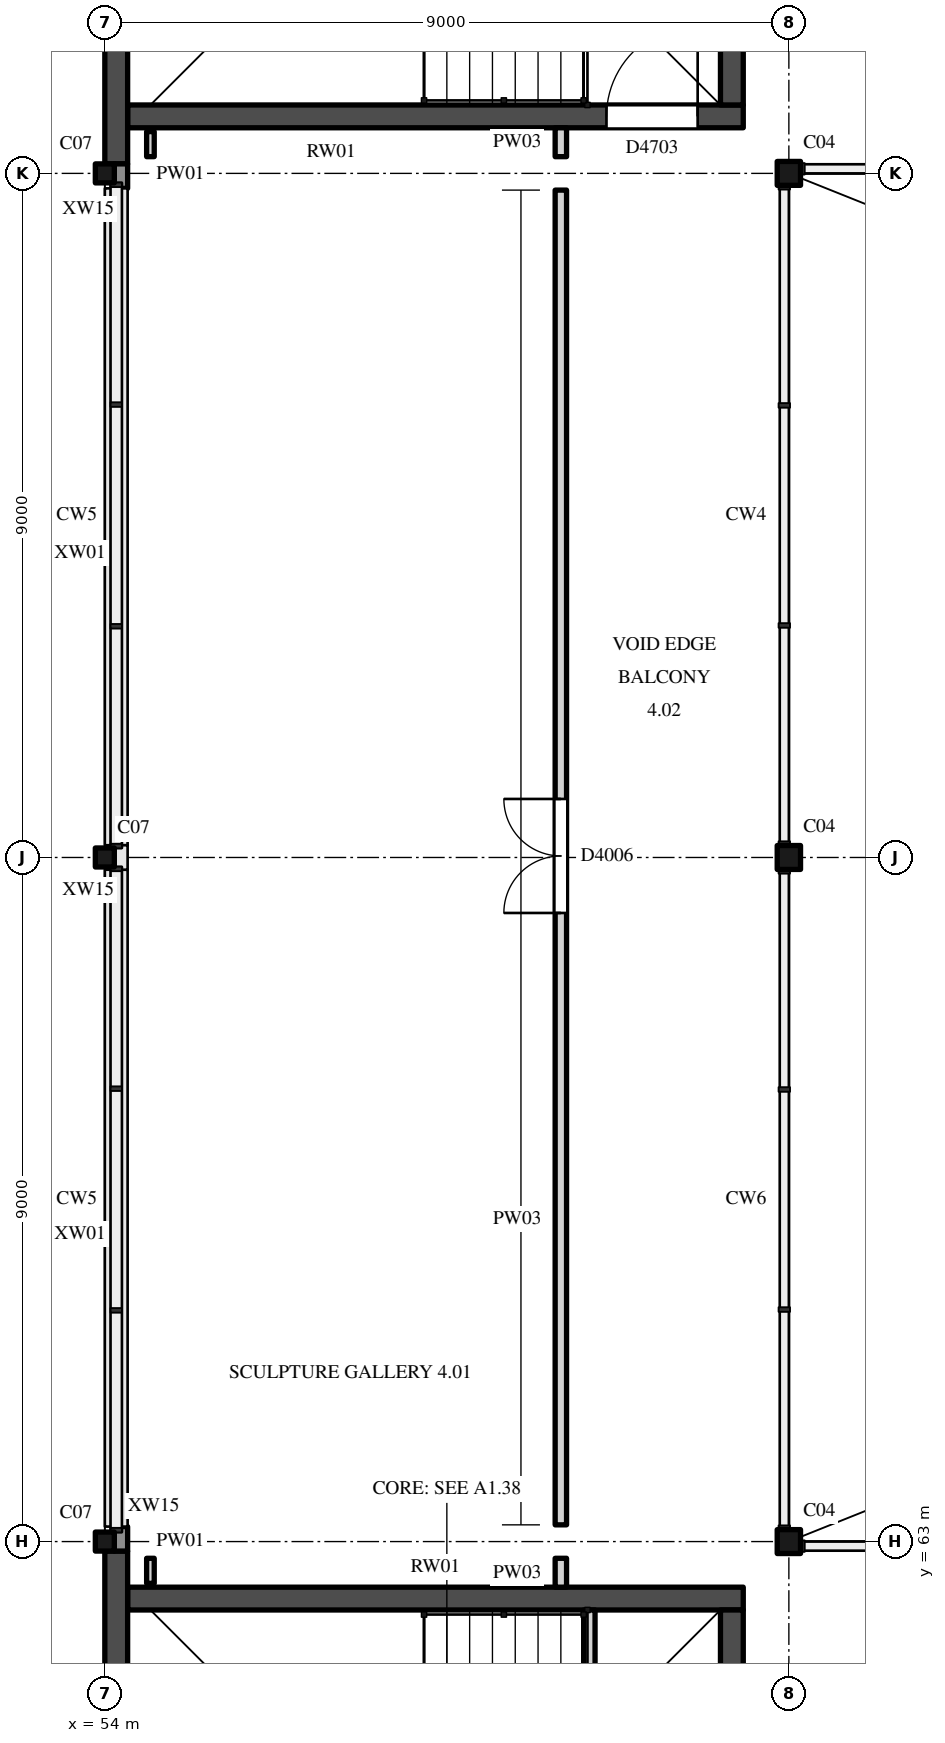
"""IFC4 building model, lengths in metres.
Left out: names, types, materials, properties, quantities, classifications, styles, units other than length and angle.
Written with IfcOpenShell. Run it as: python <this file> out.ifc"""

import sys

from ifc_helpers import new_model, si_unit, direction, frame, frame_2d, origin, origin_2d, place, context, subcontext, project, spatial, rectangle, hollow_rectangle, i_section, extrude, element, fill, save


model = new_model("IFC4")
c1 = context("Model", 3, precision=1e-05, world=origin(), true_north=direction((0.0, 1.0)))
c2 = subcontext(c1, "Body", "Model", "MODEL_VIEW")
j1 = project(units=[si_unit("LENGTHUNIT", "METRE"), si_unit("PLANEANGLEUNIT", "RADIAN")], contexts=[c1])
p1 = place(None, origin())
s1 = spatial("IfcSite", under=j1, at=p1, CompositionType="ELEMENT")
p2 = place(p1, origin())
s2 = spatial("IfcBuilding", under=s1, at=p2, CompositionType="ELEMENT")
p3 = place(p2, frame((0.0, 0.0, 26.0)))
s3 = spatial("IfcBuildingStorey", under=s2, at=p3, CompositionType="ELEMENT", Elevation=26.0)
p4 = place(p3, frame((54.0, 63.0, 0.0), z_axis=(0.0, 0.0, 1.0), x_axis=(1.0, 0.0, 0.0)))
e1 = element("IfcColumn", 1, at=p4, inside=s3, PredefinedType="COLUMN", context=c2, shape_type="SweptSolid", body=[
    extrude(hollow_rectangle(XDim=0.25, YDim=0.25, WallThickness=0.009, InnerFilletRadius=0.013, OuterFilletRadius=0.022, at=origin_2d()), origin(), (0.0, 0.0, 1.0), 5.0),
])
p5 = place(p3, frame((63.0, 63.0, 0.0), z_axis=(0.0, 0.0, 1.0), x_axis=(1.0, 0.0, 0.0)))
e2 = element("IfcColumn", 2, at=p5, inside=s3, PredefinedType="COLUMN", context=c2, shape_type="SweptSolid", body=[
    extrude(i_section(OverallWidth=0.307, OverallDepth=0.315, WebThickness=0.012, FlangeThickness=0.019, FilletRadius=0.017, at=origin_2d()), origin(), (0.0, 0.0, 1.0), 5.0),
])
p6 = place(p3, frame((54.0, 72.0, 0.0), z_axis=(0.0, 0.0, 1.0), x_axis=(1.0, 0.0, 0.0)))
e3 = element("IfcColumn", 3, at=p6, inside=s3, PredefinedType="COLUMN", context=c2, shape_type="SweptSolid", body=[
    extrude(hollow_rectangle(XDim=0.25, YDim=0.25, WallThickness=0.009, InnerFilletRadius=0.013, OuterFilletRadius=0.022, at=origin_2d()), origin(), (0.0, 0.0, 1.0), 5.0),
])
p7 = place(p3, frame((63.0, 72.0, 0.0), z_axis=(0.0, 0.0, 1.0), x_axis=(1.0, 0.0, 0.0)))
e4 = element("IfcColumn", 4, at=p7, inside=s3, PredefinedType="COLUMN", context=c2, shape_type="SweptSolid", body=[
    extrude(i_section(OverallWidth=0.307, OverallDepth=0.315, WebThickness=0.012, FlangeThickness=0.019, FilletRadius=0.017, at=origin_2d()), origin(), (0.0, 0.0, 1.0), 5.0),
])
p8 = place(p3, frame((54.0, 81.0, 0.0), z_axis=(0.0, 0.0, 1.0), x_axis=(1.0, 0.0, 0.0)))
e5 = element("IfcColumn", 5, at=p8, inside=s3, PredefinedType="COLUMN", context=c2, shape_type="SweptSolid", body=[
    extrude(hollow_rectangle(XDim=0.25, YDim=0.25, WallThickness=0.009, InnerFilletRadius=0.013, OuterFilletRadius=0.022, at=origin_2d()), origin(), (0.0, 0.0, 1.0), 5.0),
])
p9 = place(p3, frame((63.0, 81.0, 0.0), z_axis=(0.0, 0.0, 1.0), x_axis=(1.0, 0.0, 0.0)))
e6 = element("IfcColumn", 6, at=p9, inside=s3, PredefinedType="COLUMN", context=c2, shape_type="SweptSolid", body=[
    extrude(i_section(OverallWidth=0.307, OverallDepth=0.315, WebThickness=0.012, FlangeThickness=0.019, FilletRadius=0.017, at=origin_2d()), origin(), (0.0, 0.0, 1.0), 5.0),
])
p10 = place(p3, frame((54.3, 62.25, 0.0), z_axis=(0.0, 0.0, 1.0), x_axis=(1.0, 0.0, 0.0)))
e7 = element("IfcWall", 7, at=p10, inside=s3, PredefinedType="SHEAR", context=c2, shape_type="SweptSolid", body=[
    extrude(rectangle(XDim=8.1, YDim=0.3, at=frame_2d((4.05, 0.0))), origin(), (0.0, 0.0, 1.0), 5.0),
])
p11 = place(p3, frame((54.15, 54.125, 0.0), z_axis=(0.0, 0.0, 1.0), x_axis=(0.0, 1.0, 0.0)))
e8 = element("IfcWall", 8, at=p11, inside=s3, PredefinedType="SHEAR", context=c2, shape_type="SweptSolid", body=[
    extrude(rectangle(XDim=8.75, YDim=0.3, at=frame_2d((4.375, 0.0))), origin(), (0.0, 0.0, 1.0), 5.0),
])
p12 = place(p3, frame((62.25, 54.3, 0.0), z_axis=(0.0, 0.0, 1.0), x_axis=(0.0, 1.0, 0.0)))
e9 = element("IfcWall", 9, at=p12, inside=s3, PredefinedType="SHEAR", context=c2, shape_type="SweptSolid", body=[
    extrude(rectangle(XDim=7.8, YDim=0.3, at=frame_2d((3.9, 0.0))), origin(), (0.0, 0.0, 1.0), 5.0),
])
p13 = place(p12, frame((3.6, 0.0, 0.0)))
e10 = element("IfcOpeningElement", 10, at=p13, cuts=e9, PredefinedType="OPENING", context=c2, shape_type="SweptSolid", body=[
    extrude(rectangle(XDim=1.2, YDim=2.1, at=frame_2d((0.6, 1.05))), frame((0.0, 0.16, 0.0), z_axis=(0.0, -1.0, 0.0), x_axis=(1.0, 0.0, 0.0)), (0.0, 0.0, 1.0), 0.32),
])
p14 = place(p3, frame((54.3, 81.75, 0.0), z_axis=(0.0, 0.0, 1.0), x_axis=(1.0, 0.0, 0.0)))
e11 = element("IfcWall", 11, at=p14, inside=s3, PredefinedType="SHEAR", context=c2, shape_type="SweptSolid", body=[
    extrude(rectangle(XDim=8.1, YDim=0.3, at=frame_2d((4.05, 0.0))), origin(), (0.0, 0.0, 1.0), 5.0),
])
p15 = place(p14, frame((6.3, 0.0, 0.0)))
e12 = element("IfcOpeningElement", 12, at=p15, cuts=e11, PredefinedType="OPENING", context=c2, shape_type="SweptSolid", body=[
    extrude(rectangle(XDim=1.2, YDim=2.1, at=frame_2d((0.6, 1.05))), frame((0.0, 0.16, 0.0), z_axis=(0.0, -1.0, 0.0), x_axis=(1.0, 0.0, 0.0)), (0.0, 0.0, 1.0), 0.32),
])
p16 = place(p3, frame((54.15, 81.125, 0.0), z_axis=(0.0, 0.0, 1.0), x_axis=(0.0, 1.0, 0.0)))
e13 = element("IfcWall", 13, at=p16, inside=s3, PredefinedType="SHEAR", context=c2, shape_type="SweptSolid", body=[
    extrude(rectangle(XDim=8.711, YDim=0.3, at=frame_2d((4.356, 0.0))), origin(), (0.0, 0.0, 1.0), 5.0),
])
p17 = place(p3, frame((62.25, 81.9, 0.0), z_axis=(0.0, 0.0, 1.0), x_axis=(0.0, 1.0, 0.0)))
e14 = element("IfcWall", 14, at=p17, inside=s3, PredefinedType="SHEAR", context=c2, shape_type="SweptSolid", body=[
    extrude(rectangle(XDim=7.8, YDim=0.3, at=frame_2d((3.9, 0.0))), origin(), (0.0, 0.0, 1.0), 5.0),
])
p18 = place(p17, frame((3.0, 0.0, 0.0)))
e15 = element("IfcOpeningElement", 15, at=p18, cuts=e14, PredefinedType="OPENING", context=c2, shape_type="SweptSolid", body=[
    extrude(rectangle(XDim=1.2, YDim=2.1, at=frame_2d((0.6, 1.05))), frame((0.0, 0.16, 0.0), z_axis=(0.0, -1.0, 0.0), x_axis=(1.0, 0.0, 0.0)), (0.0, 0.0, 1.0), 0.32),
])
p19 = place(p3, frame((60.375, 58.5, 0.0), z_axis=(0.0, 0.0, 1.0), x_axis=(0.0, 1.0, 0.0)))
e16 = element("IfcWall", 16, at=p19, inside=s3, PredefinedType="STANDARD", context=c2, shape_type="SweptSolid", body=[
    extrude(rectangle(XDim=3.6, YDim=0.15, at=frame_2d((1.8, 0.0))), origin(), (0.0, 0.0, 1.0), 2.3),
])
for number, where, z_axis, x_axis in (
    (17, (54.15, 63.197, 0.0), (0.0, 0.0, 1.0), (0.0, 1.0, 0.0)),
    (18, (54.15, 72.161, 0.0), (0.0, 0.0, 1.0), (0.0, 1.0, 0.0)),
):
    element("IfcWall", number, at=place(p3, frame(where, z_axis=z_axis, x_axis=x_axis)), inside=s3, PredefinedType="SOLIDWALL", context=c2, shape_type="SweptSolid", body=[
        extrude(rectangle(XDim=8.642, YDim=0.3, at=frame_2d((4.321, 0.0))), origin(), (0.0, 0.0, 1.0), 1.1),
    ])
p20 = place(p3, frame((54.212, 62.875, 0.0), z_axis=(0.0, 0.0, 1.0), x_axis=(0.0, 1.0, 0.0)))
e19 = element("IfcWall", 19, at=p20, inside=s3, PredefinedType="SOLIDWALL", context=c2, shape_type="SweptSolid", body=[
    extrude(rectangle(XDim=0.322, YDim=0.175, at=frame_2d((0.161, 0.0))), origin(), (0.0, 0.0, 1.0), 5.0),
])
p21 = place(p3, frame((54.212, 71.839, 0.0), z_axis=(0.0, 0.0, 1.0), x_axis=(0.0, 1.0, 0.0)))
e20 = element("IfcWall", 20, at=p21, inside=s3, PredefinedType="SOLIDWALL", context=c2, shape_type="SweptSolid", body=[
    extrude(rectangle(XDim=0.322, YDim=0.175, at=frame_2d((0.161, 0.0))), origin(), (0.0, 0.0, 1.0), 1.1),
])
p22 = place(p3, frame((54.212, 80.803, 0.0), z_axis=(0.0, 0.0, 1.0), x_axis=(0.0, 1.0, 0.0)))
e21 = element("IfcWall", 21, at=p22, inside=s3, PredefinedType="SOLIDWALL", context=c2, shape_type="SweptSolid", body=[
    extrude(rectangle(XDim=0.322, YDim=0.175, at=frame_2d((0.161, 0.0))), origin(), (0.0, 0.0, 1.0), 5.0),
])
for number, where, z_axis, x_axis in (
    (22, (54.6, 62.45, 0.0), (0.0, 0.0, 1.0), (0.0, 1.0, 0.0)),
    (23, (54.6, 81.22, 0.0), (0.0, 0.0, 1.0), (0.0, 1.0, 0.0)),
):
    element("IfcWall", number, at=place(p3, frame(where, z_axis=z_axis, x_axis=x_axis)), inside=s3, PredefinedType="PARTITIONING", context=c2, shape_type="SweptSolid", body=[
        extrude(rectangle(XDim=0.33, YDim=0.1, at=frame_2d((0.165, 0.0))), origin(), (0.0, 0.0, 1.0), 4.825),
    ])
p23 = place(p3, frame((60.0, 62.4, 0.0), z_axis=(0.0, 0.0, 1.0), x_axis=(0.0, 1.0, 0.0)))
e24 = element("IfcWall", 24, at=p23, inside=s3, PredefinedType="PARTITIONING", context=c2, shape_type="SweptSolid", body=[
    extrude(rectangle(XDim=0.38, YDim=0.15, at=frame_2d((0.19, 0.0))), origin(), (0.0, 0.0, 1.0), 4.825),
])
p24 = place(p3, frame((60.0, 63.22, 0.0), z_axis=(0.0, 0.0, 1.0), x_axis=(0.0, 1.0, 0.0)))
e25 = element("IfcWall", 25, at=p24, inside=s3, PredefinedType="PARTITIONING", context=c2, shape_type="SweptSolid", body=[
    extrude(rectangle(XDim=17.56, YDim=0.15, at=frame_2d((8.78, 0.0))), origin(), (0.0, 0.0, 1.0), 4.825),
])
p25 = place(p24, frame((8.05, 0.0, 0.0)))
e26 = element("IfcOpeningElement", 26, at=p25, cuts=e25, PredefinedType="OPENING", context=c2, shape_type="SweptSolid", body=[
    extrude(rectangle(XDim=1.5, YDim=2.4, at=frame_2d((0.75, 1.2))), frame((0.0, 0.085, 0.0), z_axis=(0.0, -1.0, 0.0), x_axis=(1.0, 0.0, 0.0)), (0.0, 0.0, 1.0), 0.17),
])
p26 = place(p3, frame((60.0, 81.22, 0.0), z_axis=(0.0, 0.0, 1.0), x_axis=(0.0, 1.0, 0.0)))
e27 = element("IfcWall", 27, at=p26, inside=s3, PredefinedType="PARTITIONING", context=c2, shape_type="SweptSolid", body=[
    extrude(rectangle(XDim=0.38, YDim=0.15, at=frame_2d((0.19, 0.0))), origin(), (0.0, 0.0, 1.0), 4.825),
])
p27 = place(p15, origin())
e28 = element("IfcDoor", 28, at=p27, inside=s3, OperationType="SINGLE_SWING_LEFT", PredefinedType="DOOR", context=c2, shape_type="SweptSolid", body=[
    extrude(rectangle(XDim=1.2, YDim=2.1, at=frame_2d((0.6, 1.05))), frame((0.0, 0.025, 0.0), z_axis=(0.0, -1.0, 0.0), x_axis=(1.0, 0.0, 0.0)), (0.0, 0.0, 1.0), 0.05),
])
fill(e12, e28)
p28 = place(p25, origin())
e29 = element("IfcDoor", 29, at=p28, inside=s3, OperationType="DOUBLE_DOOR_SINGLE_SWING", PredefinedType="DOOR", context=c2, shape_type="SweptSolid", body=[
    extrude(rectangle(XDim=1.5, YDim=2.4, at=frame_2d((0.75, 1.2))), frame((0.0, 0.025, 0.0), z_axis=(0.0, -1.0, 0.0), x_axis=(1.0, 0.0, 0.0)), (0.0, 0.0, 1.0), 0.05),
])
fill(e26, e29)
save(model, sys.argv[1])
